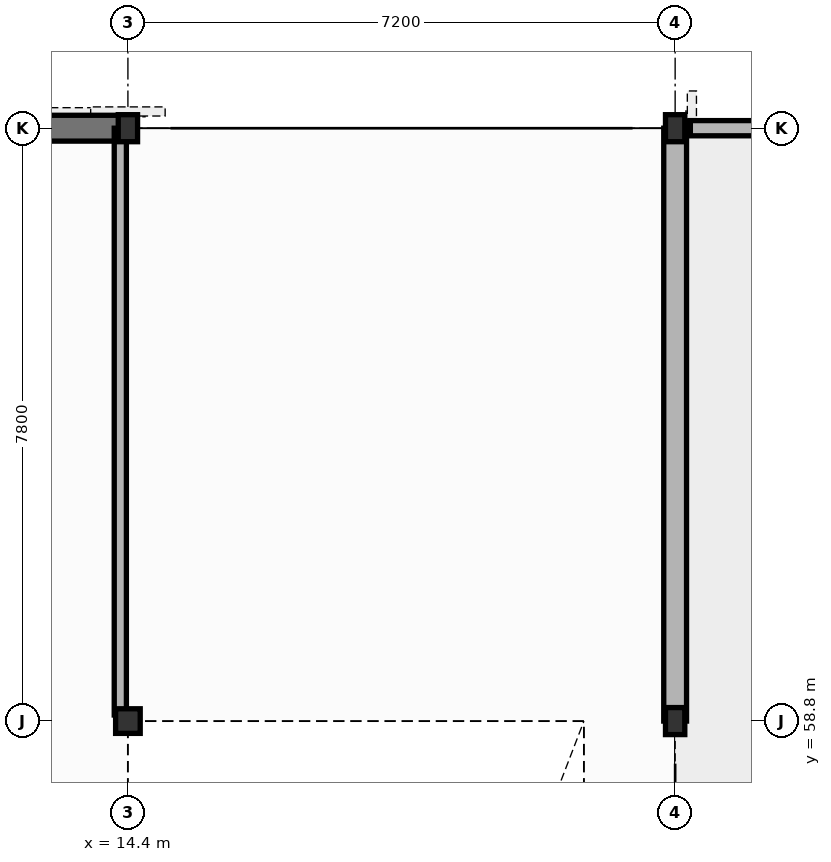
"""IFC4 building model, lengths in metres.
Left out: names, types, materials, properties, quantities, classifications, styles, units other than length and angle.
Written with IfcOpenShell. Run it as: python <this file> out.ifc"""

import sys

from ifc_helpers import new_model, si_unit, direction, frame, frame_2d, origin, origin_2d, place, context, subcontext, project, spatial, rectangle, hollow_circle, i_section, extrude, element, fill, save


model = new_model("IFC4")
c1 = context("Model", 3, precision=1e-05, world=origin(), true_north=direction((0.0, 1.0)))
c2 = subcontext(c1, "Body", "Model", "MODEL_VIEW")
j1 = project(units=[si_unit("LENGTHUNIT", "METRE"), si_unit("PLANEANGLEUNIT", "RADIAN")], contexts=[c1])
p1 = place(None, origin())
s1 = spatial("IfcSite", under=j1, at=p1, CompositionType="ELEMENT")
p2 = place(p1, origin())
s2 = spatial("IfcBuilding", under=s1, at=p2, CompositionType="ELEMENT")
p3 = place(p2, frame((0.0, 0.0, 16.52)))
s3 = spatial("IfcBuildingStorey", under=s2, at=p3, CompositionType="ELEMENT", Elevation=16.52)
p4 = place(p3, frame((14.4, 58.8, 0.0), z_axis=(0.0, 0.0, 1.0), x_axis=(1.0, 0.0, 0.0)))
e1 = element("IfcColumn", 1, at=p4, inside=s3, PredefinedType="COLUMN", context=c2, shape_type="SweptSolid", body=[
    extrude(hollow_circle(Radius=0.162, WallThickness=0.012, at=origin_2d()), origin(), (0.0, 0.0, 1.0), 3.74),
])
for number, where, z_axis, x_axis in (
    (2, (14.4, 66.6, 0.0), (0.0, 0.0, 1.0), (1.0, 0.0, 0.0)),
    (3, (21.6, 58.8, 0.0), (0.0, 0.0, 1.0), (1.0, 0.0, 0.0)),
    (4, (21.6, 66.6, 0.0), (0.0, 0.0, 1.0), (1.0, 0.0, 0.0)),
):
    element("IfcColumn", number, at=place(p3, frame(where, z_axis=z_axis, x_axis=x_axis)), inside=s3, PredefinedType="COLUMN", context=c2, shape_type="SweptSolid", body=[
        extrude(i_section(OverallWidth=0.254, OverallDepth=0.356, WebThickness=0.01, FlangeThickness=0.018, at=origin_2d()), origin(), (0.0, 0.0, 1.0), 3.74),
    ])
p5 = place(p3, frame((21.6, 58.8, 0.0), z_axis=(0.0, 0.0, 1.0), x_axis=(0.0, 1.0, 0.0)))
e5 = element("IfcWall", 5, at=p5, inside=s3, PredefinedType="SOLIDWALL", context=c2, shape_type="SweptSolid", body=[
    extrude(rectangle(XDim=7.8, YDim=0.3, at=frame_2d((3.9, 0.0))), origin(), (0.0, 0.0, 1.0), 2.863),
])
p6 = place(p5, frame((1.6, 0.0, 0.643)))
e6 = element("IfcOpeningElement", 6, at=p6, cuts=e5, PredefinedType="OPENING", context=c2, shape_type="SweptSolid", body=[
    extrude(rectangle(XDim=1.95, YDim=2.1, at=frame_2d((0.975, 1.05))), frame((0.0, 0.16, 0.0), z_axis=(0.0, -1.0, 0.0), x_axis=(1.0, 0.0, 0.0)), (0.0, 0.0, 1.0), 0.32),
])
p7 = place(p5, frame((4.5, 0.0, 0.693)))
e7 = element("IfcOpeningElement", 7, at=p7, cuts=e5, PredefinedType="OPENING", context=c2, shape_type="SweptSolid", body=[
    extrude(rectangle(XDim=1.6, YDim=2.05, at=frame_2d((0.8, 1.025))), frame((0.0, 0.16, 0.0), z_axis=(0.0, -1.0, 0.0), x_axis=(1.0, 0.0, 0.0)), (0.0, 0.0, 1.0), 0.32),
])
p8 = place(p3, frame((7.2, 66.6, 0.0), z_axis=(0.0, 0.0, 1.0), x_axis=(1.0, 0.0, 0.0)))
e8 = element("IfcWall", 8, at=p8, inside=s3, PredefinedType="SOLIDWALL", context=c2, shape_type="SweptSolid", body=[
    extrude(rectangle(XDim=7.2, YDim=0.34, at=frame_2d((3.6, 0.0))), origin(), (0.0, 0.0, 1.0), 3.46),
])
p9 = place(p8, frame((4.4, 0.0, 0.9)))
e9 = element("IfcOpeningElement", 9, at=p9, cuts=e8, PredefinedType="OPENING", context=c2, shape_type="SweptSolid", body=[
    extrude(rectangle(XDim=1.75, YDim=2.15, at=frame_2d((0.875, 1.075))), frame((0.0, 0.18, 0.0), z_axis=(0.0, -1.0, 0.0), x_axis=(1.0, 0.0, 0.0)), (0.0, 0.0, 1.0), 0.36),
])
p10 = place(p3, frame((28.6, 66.6, 0.0), z_axis=(0.0, 0.0, 1.0), x_axis=(-1.0, 0.0, 0.0)))
e10 = element("IfcWall", 10, at=p10, inside=s3, PredefinedType="PARAPET", context=c2, shape_type="SweptSolid", body=[
    extrude(rectangle(XDim=6.8, YDim=0.2, at=frame_2d((3.4, 0.0))), origin(), (0.0, 0.0, 1.0), 0.72),
])
p11 = place(p3, frame((14.3, 58.88, 0.0), z_axis=(0.0, 0.0, 1.0), x_axis=(0.0, 1.0, 0.0)))
e11 = element("IfcWall", 11, at=p11, inside=s3, PredefinedType="PARTITIONING", context=c2, shape_type="SweptSolid", body=[
    extrude(rectangle(XDim=7.72, YDim=0.16, at=frame_2d((3.86, 0.0))), origin(), (0.0, 0.0, 1.0), 2.863),
])
p12 = place(p11, frame((2.5, 0.0, 0.0)))
e12 = element("IfcOpeningElement", 12, at=p12, cuts=e11, PredefinedType="OPENING", context=c2, shape_type="SweptSolid", body=[
    extrude(rectangle(XDim=1.0, YDim=2.15, at=frame_2d((0.5, 1.075))), frame((0.0, 0.09, 0.0), z_axis=(0.0, -1.0, 0.0), x_axis=(1.0, 0.0, 0.0)), (0.0, 0.0, 1.0), 0.18),
])
p13 = place(p6, origin())
e13 = element("IfcWindow", 13, at=p13, inside=s3, PartitioningType="SINGLE_PANEL", PredefinedType="WINDOW", context=c2, shape_type="SweptSolid", body=[
    extrude(rectangle(XDim=1.95, YDim=2.1, at=frame_2d((0.975, 1.05))), frame((0.0, 0.03, 0.0), z_axis=(0.0, -1.0, 0.0), x_axis=(1.0, 0.0, 0.0)), (0.0, 0.0, 1.0), 0.06),
])
fill(e6, e13)
p14 = place(p7, origin())
e14 = element("IfcWindow", 14, at=p14, inside=s3, PartitioningType="SINGLE_PANEL", PredefinedType="WINDOW", context=c2, shape_type="SweptSolid", body=[
    extrude(rectangle(XDim=1.6, YDim=2.05, at=frame_2d((0.8, 1.025))), frame((0.0, 0.03, 0.0), z_axis=(0.0, -1.0, 0.0), x_axis=(1.0, 0.0, 0.0)), (0.0, 0.0, 1.0), 0.06),
])
fill(e7, e14)
p15 = place(p12, origin())
e15 = element("IfcDoor", 15, at=p15, inside=s3, OperationType="SINGLE_SWING_RIGHT", PredefinedType="DOOR", context=c2, shape_type="SweptSolid", body=[
    extrude(rectangle(XDim=1.0, YDim=2.15, at=frame_2d((0.5, 1.075))), frame((0.0, 0.025, 0.0), z_axis=(0.0, -1.0, 0.0), x_axis=(1.0, 0.0, 0.0)), (0.0, 0.0, 1.0), 0.05),
])
fill(e12, e15)
save(model, sys.argv[1])
